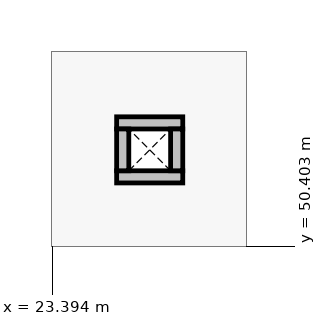
"""IFC4 building model, lengths in metres.
Left out: names, types, materials, properties, quantities, classifications, styles, units other than length and angle.
Written with IfcOpenShell. Run it as: python <this file> out.ifc"""

import sys

from ifc_helpers import new_model, si_unit, direction, frame, frame_2d, origin, place, context, subcontext, project, spatial, rectangle, extrude, element, save


model = new_model("IFC4")
c1 = context("Model", 3, precision=1e-05, world=origin(), true_north=direction((0.0, 1.0)))
c2 = subcontext(c1, "Body", "Model", "MODEL_VIEW")
j1 = project(units=[si_unit("LENGTHUNIT", "METRE"), si_unit("PLANEANGLEUNIT", "RADIAN")], contexts=[c1])
p1 = place(None, origin())
s1 = spatial("IfcSite", under=j1, at=p1, CompositionType="ELEMENT")
p2 = place(p1, origin())
s2 = spatial("IfcBuilding", under=s1, at=p2, CompositionType="ELEMENT")
p3 = place(p2, frame((0.0, 0.0, 4.8)))
s3 = spatial("IfcBuildingStorey", under=s2, at=p3, CompositionType="ELEMENT", Elevation=4.8)
for number, where, z_axis, x_axis in (
    (1, (24.24, 51.32, 0.0), (0.0, 0.0, 1.0), (1.0, 0.0, 0.0)),
    (2, (24.24, 52.03, 0.0), (0.0, 0.0, 1.0), (1.0, 0.0, 0.0)),
):
    element("IfcWall", number, at=place(p3, frame(where, z_axis=z_axis, x_axis=x_axis)), inside=s3, PredefinedType="PARTITIONING", context=c2, shape_type="SweptSolid", body=[
        extrude(rectangle(XDim=0.87, YDim=0.16, at=frame_2d((0.435, 0.0))), origin(), (0.0, 0.0, 1.0), 3.35),
    ])
for number, where, z_axis, x_axis in (
    (3, (24.32, 51.4, 0.0), (0.0, 0.0, 1.0), (0.0, 1.0, 0.0)),
    (4, (25.03, 51.4, 0.0), (0.0, 0.0, 1.0), (0.0, 1.0, 0.0)),
):
    element("IfcWall", number, at=place(p3, frame(where, z_axis=z_axis, x_axis=x_axis)), inside=s3, PredefinedType="PARTITIONING", context=c2, shape_type="SweptSolid", body=[
        extrude(rectangle(XDim=0.55, YDim=0.16, at=frame_2d((0.275, 0.0))), origin(), (0.0, 0.0, 1.0), 3.35),
    ])
save(model, sys.argv[1])
